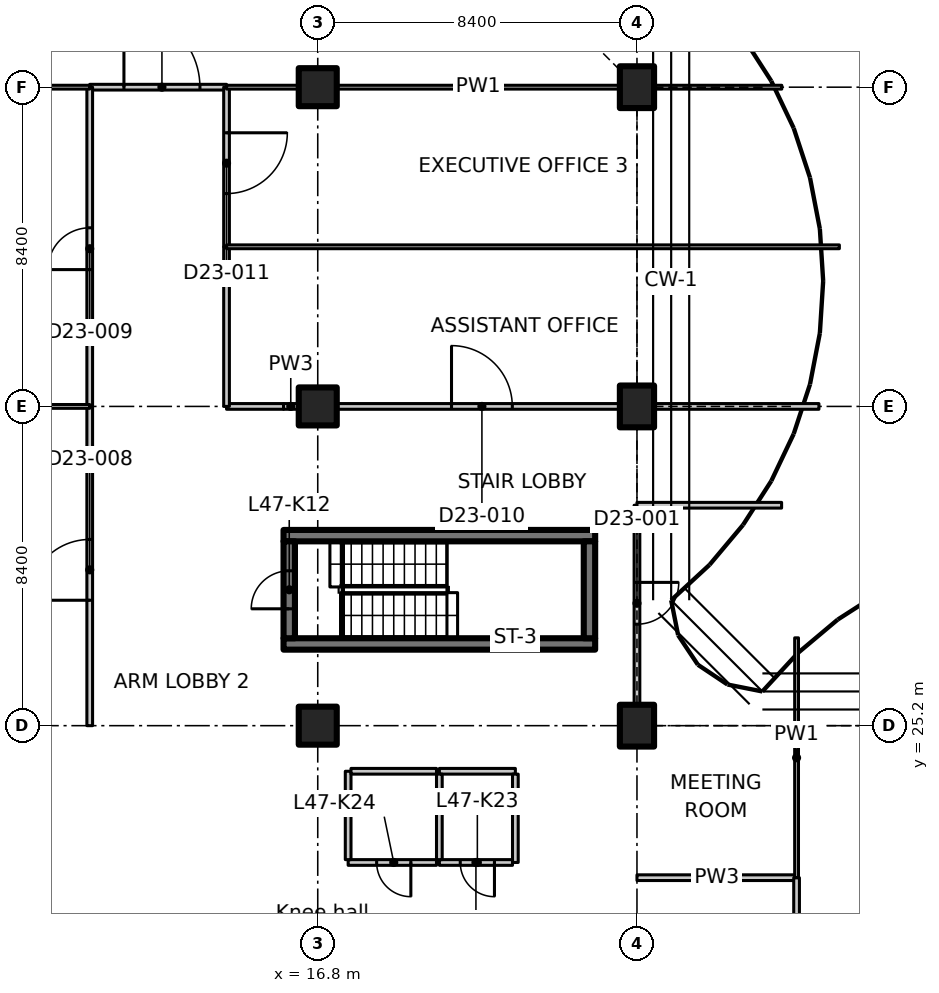
"""IFC4 building model, lengths in metres.
Left out: names, types, materials, properties, quantities, classifications, styles, units other than length and angle.
Written with IfcOpenShell. Run it as: python <this file> out.ifc"""

import sys

from ifc_helpers import new_model, si_unit, direction, frame, frame_2d, origin, origin_2d, place, context, subcontext, project, spatial, polyline, rectangle, outline, extrude, element, fill, save


model = new_model("IFC4")
c1 = context("Model", 3, precision=1e-05, world=origin(), true_north=direction((0.0, 1.0)))
c2 = subcontext(c1, "Body", "Model", "MODEL_VIEW")
j1 = project(units=[si_unit("LENGTHUNIT", "METRE"), si_unit("PLANEANGLEUNIT", "RADIAN")], contexts=[c1])
p1 = place(None, origin())
s1 = spatial("IfcSite", under=j1, at=p1, CompositionType="ELEMENT")
p2 = place(p1, origin())
s2 = spatial("IfcBuilding", under=s1, at=p2, CompositionType="ELEMENT")
p3 = place(p2, frame((0.0, 0.0, 188.4)))
s3 = spatial("IfcBuildingStorey", under=s2, at=p3, CompositionType="ELEMENT", Elevation=188.4)
for number, where, z_axis, x_axis in (
    (1, (16.8, 25.2, 0.0), (0.0, 0.0, 1.0), (1.0, 0.0, 0.0)),
    (2, (16.8, 33.6, 0.0), (0.0, 0.0, 1.0), (1.0, 0.0, 0.0)),
    (3, (16.8, 42.0, 0.0), (0.0, 0.0, 1.0), (1.0, 0.0, 0.0)),
):
    element("IfcColumn", number, at=place(p3, frame(where, z_axis=z_axis, x_axis=x_axis)), inside=s3, PredefinedType="COLUMN", context=c2, shape_type="SweptSolid", body=[
        extrude(rectangle(XDim=1.0, YDim=1.0, at=origin_2d()), origin(), (0.0, 0.0, 1.0), 3.35),
    ])
for number, where, z_axis, x_axis in (
    (4, (25.2, 25.2, 0.0), (0.0, 0.0, 1.0), (1.0, 0.0, 0.0)),
    (5, (25.2, 33.6, 0.0), (0.0, 0.0, 1.0), (1.0, 0.0, 0.0)),
    (6, (25.2, 42.0, 0.0), (0.0, 0.0, 1.0), (1.0, 0.0, 0.0)),
):
    element("IfcColumn", number, at=place(p3, frame(where, z_axis=z_axis, x_axis=x_axis)), inside=s3, PredefinedType="COLUMN", context=c2, shape_type="SweptSolid", body=[
        extrude(rectangle(XDim=0.9, YDim=1.1, at=origin_2d()), origin(), (0.0, 0.0, 1.0), 3.35),
    ])
for number, where, z_axis, x_axis in (
    (7, (15.9, 27.35, 0.0), (0.0, 0.0, 1.0), (1.0, 0.0, 0.0)),
    (8, (15.9, 30.2, 0.0), (0.0, 0.0, 1.0), (1.0, 0.0, 0.0)),
):
    element("IfcWall", number, at=place(p3, frame(where, z_axis=z_axis, x_axis=x_axis)), inside=s3, PredefinedType="SHEAR", context=c2, shape_type="SweptSolid", body=[
        extrude(rectangle(XDim=8.2, YDim=0.3, at=frame_2d((4.1, 0.0))), origin(), (0.0, 0.0, 1.0), 3.35),
    ])
p4 = place(p3, frame((16.05, 27.5, 0.0), z_axis=(0.0, 0.0, 1.0), x_axis=(0.0, 1.0, 0.0)))
e9 = element("IfcWall", 9, at=p4, inside=s3, PredefinedType="SHEAR", context=c2, shape_type="SweptSolid", body=[
    extrude(rectangle(XDim=2.55, YDim=0.3, at=frame_2d((1.275, 0.0))), origin(), (0.0, 0.0, 1.0), 3.35),
])
p5 = place(p4, frame((0.775, 0.0, 0.0)))
e10 = element("IfcOpeningElement", 10, at=p5, cuts=e9, PredefinedType="OPENING", context=c2, shape_type="SweptSolid", body=[
    extrude(rectangle(XDim=1.0, YDim=2.1, at=frame_2d((0.5, 1.05))), frame((0.0, 0.16, 0.0), z_axis=(0.0, -1.0, 0.0), x_axis=(1.0, 0.0, 0.0)), (0.0, 0.0, 1.0), 0.32),
])
p6 = place(p3, frame((23.95, 27.5, 0.0), z_axis=(0.0, 0.0, 1.0), x_axis=(0.0, 1.0, 0.0)))
e11 = element("IfcWall", 11, at=p6, inside=s3, PredefinedType="SHEAR", context=c2, shape_type="SweptSolid", body=[
    extrude(rectangle(XDim=2.55, YDim=0.3, at=frame_2d((1.275, 0.0))), origin(), (0.0, 0.0, 1.0), 3.35),
])
p7 = place(p3, frame((20.0, 24.0, 0.0), z_axis=(0.0, 0.0, 1.0), x_axis=(1.0, 0.0, 0.0)))
e12 = element("IfcWall", 12, at=p7, inside=s3, PredefinedType="PARTITIONING", context=c2, shape_type="SweptSolid", body=[
    extrude(rectangle(XDim=2.0, YDim=0.15, at=frame_2d((1.0, 0.0))), origin(), (0.0, 0.0, 1.0), 3.35),
])
p8 = place(p3, frame((22.0, 23.925, 0.0), z_axis=(0.0, 0.0, 1.0), x_axis=(0.0, -1.0, 0.0)))
e13 = element("IfcWall", 13, at=p8, inside=s3, PredefinedType="PARTITIONING", context=c2, shape_type="SweptSolid", body=[
    extrude(rectangle(XDim=2.325, YDim=0.15, at=frame_2d((1.163, 0.0))), origin(), (0.0, 0.0, 1.0), 3.35),
])
p9 = place(p3, frame((21.925, 21.6, 0.0), z_axis=(0.0, 0.0, 1.0), x_axis=(-1.0, 0.0, 0.0)))
e14 = element("IfcWall", 14, at=p9, inside=s3, PredefinedType="PARTITIONING", context=c2, shape_type="SweptSolid", body=[
    extrude(rectangle(XDim=1.925, YDim=0.15, at=frame_2d((0.962, 0.0))), origin(), (0.0, 0.0, 1.0), 3.35),
])
p10 = place(p9, frame((0.475, 0.0, 0.0)))
e15 = element("IfcOpeningElement", 15, at=p10, cuts=e14, PredefinedType="OPENING", context=c2, shape_type="SweptSolid", body=[
    extrude(rectangle(XDim=0.9, YDim=2.1, at=frame_2d((0.45, 1.05))), frame((0.0, 0.085, 0.0), z_axis=(0.0, -1.0, 0.0), x_axis=(1.0, 0.0, 0.0)), (0.0, 0.0, 1.0), 0.17),
])
p11 = place(p3, frame((20.0, 21.675, 0.0), z_axis=(0.0, 0.0, 1.0), x_axis=(0.0, 1.0, 0.0)))
e16 = element("IfcWall", 16, at=p11, inside=s3, PredefinedType="PARTITIONING", context=c2, shape_type="SweptSolid", body=[
    extrude(rectangle(XDim=2.25, YDim=0.15, at=frame_2d((1.125, 0.0))), origin(), (0.0, 0.0, 1.0), 3.35),
])
p12 = place(p3, frame((19.925, 21.6, 0.0), z_axis=(0.0, 0.0, 1.0), x_axis=(-1.0, 0.0, 0.0)))
e17 = element("IfcWall", 17, at=p12, inside=s3, PredefinedType="PARTITIONING", context=c2, shape_type="SweptSolid", body=[
    extrude(rectangle(XDim=2.325, YDim=0.15, at=frame_2d((1.163, 0.0))), origin(), (0.0, 0.0, 1.0), 3.35),
])
p13 = place(p12, frame((0.675, 0.0, 0.0)))
e18 = element("IfcOpeningElement", 18, at=p13, cuts=e17, PredefinedType="OPENING", context=c2, shape_type="SweptSolid", body=[
    extrude(rectangle(XDim=0.9, YDim=2.1, at=frame_2d((0.45, 1.05))), frame((0.0, 0.085, 0.0), z_axis=(0.0, -1.0, 0.0), x_axis=(1.0, 0.0, 0.0)), (0.0, 0.0, 1.0), 0.17),
])
p14 = place(p3, frame((17.6, 21.675, 0.0), z_axis=(0.0, 0.0, 1.0), x_axis=(0.0, 1.0, 0.0)))
e19 = element("IfcWall", 19, at=p14, inside=s3, PredefinedType="PARTITIONING", context=c2, shape_type="SweptSolid", body=[
    extrude(rectangle(XDim=2.325, YDim=0.15, at=frame_2d((1.163, 0.0))), origin(), (0.0, 0.0, 1.0), 3.35),
])
p15 = place(p3, frame((17.675, 24.0, 0.0), z_axis=(0.0, 0.0, 1.0), x_axis=(1.0, 0.0, 0.0)))
e20 = element("IfcWall", 20, at=p15, inside=s3, PredefinedType="PARTITIONING", context=c2, shape_type="SweptSolid", body=[
    extrude(rectangle(XDim=2.25, YDim=0.15, at=frame_2d((1.125, 0.0))), origin(), (0.0, 0.0, 1.0), 3.35),
])
p16 = place(p3, frame((25.2, 21.2, 0.0), z_axis=(0.0, 0.0, 1.0), x_axis=(1.0, 0.0, 0.0)))
e21 = element("IfcWall", 21, at=p16, inside=s3, PredefinedType="PARTITIONING", context=c2, shape_type="SweptSolid", body=[
    extrude(rectangle(XDim=4.2, YDim=0.15, at=frame_2d((2.1, 0.0))), origin(), (0.0, 0.0, 1.0), 3.33),
])
p17 = place(p3, frame((29.4, 21.2, 0.0), z_axis=(0.0, 0.0, 1.0), x_axis=(0.0, -1.0, 0.0)))
e22 = element("IfcWall", 22, at=p17, inside=s3, PredefinedType="PARTITIONING", context=c2, shape_type="SweptSolid", body=[
    extrude(rectangle(XDim=8.2, YDim=0.15, at=frame_2d((4.1, 0.0))), origin(), (0.0, 0.0, 1.0), 3.33),
])
p18 = place(p3, frame((29.4, 27.511, 0.0), z_axis=(0.0, 0.0, 1.0), x_axis=(0.0, -1.0, 0.0)))
e23 = element("IfcWall", 23, at=p18, inside=s3, PredefinedType="PARTITIONING", context=c2, shape_type="SweptSolid", body=[
    extrude(outline(polyline([(0.0, 0.0), (6.311, 0.0), (6.311, 3.33), (2.761, 3.33), (2.759, 2.98), (1.863, 2.98), (1.861, 3.33), (0.236, 3.33), (0.0, 3.33), (0.0, 0.0)])), frame((0.0, 0.05, 0.0), z_axis=(0.0, -1.0, 0.0), x_axis=(1.0, 0.0, 0.0)), (0.0, 0.0, 1.0), 0.1),
])
p19 = place(p3, frame((25.2, 31.0, 0.0), z_axis=(0.0, 0.0, 1.0), x_axis=(0.0, -1.0, 0.0)))
e24 = element("IfcWall", 24, at=p19, inside=s3, PredefinedType="PARTITIONING", context=c2, shape_type="SweptSolid", body=[
    extrude(outline(polyline([(0.0, 0.0), (5.23, 0.0), (5.23, 2.98), (0.0, 2.98), (0.0, 0.0)])), frame((0.0, 0.075, 0.0), z_axis=(0.0, -1.0, 0.0), x_axis=(1.0, 0.0, 0.0)), (0.0, 0.0, 1.0), 0.15),
])
p20 = place(p19, frame((2.03, 0.0, 0.0)))
e25 = element("IfcOpeningElement", 25, at=p20, cuts=e24, PredefinedType="OPENING", context=c2, shape_type="SweptSolid", body=[
    extrude(rectangle(XDim=1.1, YDim=2.1, at=frame_2d((0.55, 1.05))), frame((0.0, 0.085, 0.0), z_axis=(0.0, -1.0, 0.0), x_axis=(1.0, 0.0, 0.0)), (0.0, 0.0, 1.0), 0.17),
])
p21 = place(p3, frame((25.2, 31.0, 0.0), z_axis=(0.0, 0.0, 1.0), x_axis=(1.0, 0.0, 0.0)))
e26 = element("IfcWall", 26, at=p21, inside=s3, PredefinedType="PARTITIONING", context=c2, shape_type="SweptSolid", body=[
    extrude(rectangle(XDim=3.806, YDim=0.15, at=frame_2d((1.903, 0.0))), origin(), (0.0, 0.0, 1.0), 2.98),
])
p22 = place(p3, frame((10.8, 25.2, 0.0), z_axis=(0.0, 0.0, 1.0), x_axis=(0.0, 1.0, 0.0)))
e27 = element("IfcWall", 27, at=p22, inside=s3, PredefinedType="PARTITIONING", context=c2, shape_type="SweptSolid", body=[
    extrude(rectangle(XDim=8.4, YDim=0.15, at=frame_2d((4.2, 0.0))), origin(), (0.0, 0.0, 1.0), 3.33),
])
p23 = place(p22, frame((3.3, 0.0, 0.0)))
e28 = element("IfcOpeningElement", 28, at=p23, cuts=e27, PredefinedType="OPENING", context=c2, shape_type="SweptSolid", body=[
    extrude(rectangle(XDim=1.6, YDim=2.1, at=frame_2d((0.8, 1.05))), frame((0.0, 0.085, 0.0), z_axis=(0.0, -1.0, 0.0), x_axis=(1.0, 0.0, 0.0)), (0.0, 0.0, 1.0), 0.17),
])
p24 = place(p3, frame((14.4, 33.6, 0.0), z_axis=(0.0, 0.0, 1.0), x_axis=(1.0, 0.0, 0.0)))
e29 = element("IfcWall", 29, at=p24, inside=s3, PredefinedType="PARTITIONING", context=c2, shape_type="SweptSolid", body=[
    extrude(rectangle(XDim=1.5, YDim=0.15, at=frame_2d((0.75, 0.0))), origin(), (0.0, 0.0, 1.0), 3.33),
])
p25 = place(p3, frame((15.9, 33.6, 0.0), z_axis=(0.0, 0.0, 1.0), x_axis=(1.0, 0.0, 0.0)))
e30 = element("IfcWall", 30, at=p25, inside=s3, PredefinedType="PARTITIONING", context=c2, shape_type="SweptSolid", body=[
    extrude(rectangle(XDim=0.38, YDim=0.15, at=frame_2d((0.19, 0.0))), origin(), (0.0, 0.0, 1.0), 3.33),
])
p26 = place(p3, frame((17.32, 33.6, 0.0), z_axis=(0.0, 0.0, 1.0), x_axis=(1.0, 0.0, 0.0)))
e31 = element("IfcWall", 31, at=p26, inside=s3, PredefinedType="PARTITIONING", context=c2, shape_type="SweptSolid", body=[
    extrude(rectangle(XDim=7.41, YDim=0.15, at=frame_2d((3.705, 0.0))), origin(), (0.0, 0.0, 1.0), 3.33),
])
p27 = place(p26, frame((3.0, 0.0, 0.0)))
e32 = element("IfcOpeningElement", 32, at=p27, cuts=e31, PredefinedType="OPENING", context=c2, shape_type="SweptSolid", body=[
    extrude(rectangle(XDim=1.6, YDim=2.1, at=frame_2d((0.8, 1.05))), frame((0.0, 0.085, 0.0), z_axis=(0.0, -1.0, 0.0), x_axis=(1.0, 0.0, 0.0)), (0.0, 0.0, 1.0), 0.17),
])
p28 = place(p3, frame((25.67, 33.6, 0.0), z_axis=(0.0, 0.0, 1.0), x_axis=(1.0, 0.0, 0.0)))
e33 = element("IfcWall", 33, at=p28, inside=s3, PredefinedType="PARTITIONING", context=c2, shape_type="SweptSolid", body=[
    extrude(rectangle(XDim=4.318, YDim=0.15, at=frame_2d((2.159, 0.0))), origin(), (0.0, 0.0, 1.0), 2.98),
])
p29 = place(p3, frame((10.8, 42.0, 0.0), z_axis=(0.0, 0.0, 1.0), x_axis=(1.0, 0.0, 0.0)))
e34 = element("IfcWall", 34, at=p29, inside=s3, PredefinedType="PARTITIONING", context=c2, shape_type="SweptSolid", body=[
    extrude(rectangle(XDim=3.6, YDim=0.15, at=frame_2d((1.8, 0.0))), origin(), (0.0, 0.0, 1.0), 3.33),
])
p30 = place(p29, frame((0.9, 0.0, 0.0)))
e35 = element("IfcOpeningElement", 35, at=p30, cuts=e34, PredefinedType="OPENING", context=c2, shape_type="SweptSolid", body=[
    extrude(rectangle(XDim=2.0, YDim=2.4, at=frame_2d((1.0, 1.2))), frame((0.0, 0.085, 0.0), z_axis=(0.0, -1.0, 0.0), x_axis=(1.0, 0.0, 0.0)), (0.0, 0.0, 1.0), 0.17),
])
p31 = place(p3, frame((10.8, 33.6, 0.0), z_axis=(0.0, 0.0, 1.0), x_axis=(0.0, 1.0, 0.0)))
e36 = element("IfcWall", 36, at=p31, inside=s3, PredefinedType="PARTITIONING", context=c2, shape_type="SweptSolid", body=[
    extrude(rectangle(XDim=8.4, YDim=0.15, at=frame_2d((4.2, 0.0))), origin(), (0.0, 0.0, 1.0), 3.33),
])
p32 = place(p31, frame((3.6, 0.0, 0.0)))
e37 = element("IfcOpeningElement", 37, at=p32, cuts=e36, PredefinedType="OPENING", context=c2, shape_type="SweptSolid", body=[
    extrude(rectangle(XDim=1.1, YDim=2.1, at=frame_2d((0.55, 1.05))), frame((0.0, 0.085, 0.0), z_axis=(0.0, -1.0, 0.0), x_axis=(1.0, 0.0, 0.0)), (0.0, 0.0, 1.0), 0.17),
])
p33 = place(p3, frame((14.4, 37.8, 0.0), z_axis=(0.0, 0.0, 1.0), x_axis=(0.0, -1.0, 0.0)))
e38 = element("IfcWall", 38, at=p33, inside=s3, PredefinedType="PARTITIONING", context=c2, shape_type="SweptSolid", body=[
    extrude(rectangle(XDim=4.2, YDim=0.15, at=frame_2d((2.1, 0.0))), origin(), (0.0, 0.0, 1.0), 3.33),
])
p34 = place(p3, frame((14.4, 42.0, 0.0), z_axis=(0.0, 0.0, 1.0), x_axis=(0.0, -1.0, 0.0)))
e39 = element("IfcWall", 39, at=p34, inside=s3, PredefinedType="PARTITIONING", context=c2, shape_type="SweptSolid", body=[
    extrude(rectangle(XDim=4.2, YDim=0.15, at=frame_2d((2.1, 0.0))), origin(), (0.0, 0.0, 1.0), 3.33),
])
p35 = place(p34, frame((1.2, 0.0, 0.0)))
e40 = element("IfcOpeningElement", 40, at=p35, cuts=e39, PredefinedType="OPENING", context=c2, shape_type="SweptSolid", body=[
    extrude(rectangle(XDim=1.6, YDim=2.1, at=frame_2d((0.8, 1.05))), frame((0.0, 0.085, 0.0), z_axis=(0.0, -1.0, 0.0), x_axis=(1.0, 0.0, 0.0)), (0.0, 0.0, 1.0), 0.17),
])
p36 = place(p3, frame((10.8, 42.0, 0.0), z_axis=(0.0, 0.0, 1.0), x_axis=(-1.0, 0.0, 0.0)))
e41 = element("IfcWall", 41, at=p36, inside=s3, PredefinedType="PARTITIONING", context=c2, shape_type="SweptSolid", body=[
    extrude(rectangle(XDim=1.88, YDim=0.1, at=frame_2d((0.94, 0.0))), origin(), (0.0, 0.0, 1.0), 3.33),
])
p37 = place(p3, frame((29.011, 42.0, 0.0), z_axis=(0.0, 0.0, 1.0), x_axis=(-1.0, 0.0, 0.0)))
e42 = element("IfcWall", 42, at=p37, inside=s3, PredefinedType="PARTITIONING", context=c2, shape_type="SweptSolid", body=[
    extrude(rectangle(XDim=3.342, YDim=0.1, at=frame_2d((1.671, 0.0))), origin(), (0.0, 0.0, 1.0), 2.98),
])
p38 = place(p3, frame((24.73, 42.0, 0.0), z_axis=(0.0, 0.0, 1.0), x_axis=(-1.0, 0.0, 0.0)))
e43 = element("IfcWall", 43, at=p38, inside=s3, PredefinedType="PARTITIONING", context=c2, shape_type="SweptSolid", body=[
    extrude(outline(polyline([(0.0, 0.0), (7.41, 0.0), (7.41, 3.33), (0.196, 3.33), (0.194, 2.98), (0.0, 2.98), (0.0, 0.0)])), frame((0.0, 0.05, 0.0), z_axis=(0.0, -1.0, 0.0), x_axis=(1.0, 0.0, 0.0)), (0.0, 0.0, 1.0), 0.1),
])
for number, where, z_axis, x_axis in (
    (44, (16.28, 42.0, 0.0), (0.0, 0.0, 1.0), (-1.0, 0.0, 0.0)),
    (45, (8.92, 33.6, 0.0), (0.0, 0.0, 1.0), (1.0, 0.0, 0.0)),
):
    element("IfcWall", number, at=place(p3, frame(where, z_axis=z_axis, x_axis=x_axis)), inside=s3, PredefinedType="PARTITIONING", context=c2, shape_type="SweptSolid", body=[
        extrude(rectangle(XDim=1.88, YDim=0.1, at=frame_2d((0.94, 0.0))), origin(), (0.0, 0.0, 1.0), 3.33),
    ])
p39 = place(p3, frame((14.4, 37.8, 0.0), z_axis=(0.0, 0.0, 1.0), x_axis=(1.0, 0.0, 0.0)))
e46 = element("IfcWall", 46, at=p39, inside=s3, PredefinedType="PARTITIONING", context=c2, shape_type="SweptSolid", body=[
    extrude(outline(polyline([(0.0, 0.0), (16.126, 0.0), (16.126, 3.33), (15.843, 3.33), (11.25, 3.33), (11.248, 2.98), (10.352, 2.98), (10.35, 3.33), (0.0, 3.33), (0.0, 0.0)])), frame((0.0, 0.05, 0.0), z_axis=(0.0, -1.0, 0.0), x_axis=(1.0, 0.0, 0.0)), (0.0, 0.0, 1.0), 0.1),
])
p40 = place(p5, origin())
e47 = element("IfcDoor", 47, at=p40, inside=s3, OperationType="SINGLE_SWING_RIGHT", PredefinedType="DOOR", context=c2, shape_type="SweptSolid", body=[
    extrude(rectangle(XDim=1.0, YDim=2.1, at=frame_2d((0.5, 1.05))), frame((0.0, 0.025, 0.0), z_axis=(0.0, -1.0, 0.0), x_axis=(1.0, 0.0, 0.0)), (0.0, 0.0, 1.0), 0.05),
])
fill(e10, e47)
p41 = place(p10, origin())
e48 = element("IfcDoor", 48, at=p41, inside=s3, OperationType="SINGLE_SWING_LEFT", PredefinedType="DOOR", context=c2, shape_type="SweptSolid", body=[
    extrude(rectangle(XDim=0.9, YDim=2.1, at=frame_2d((0.45, 1.05))), frame((0.0, 0.025, 0.0), z_axis=(0.0, -1.0, 0.0), x_axis=(1.0, 0.0, 0.0)), (0.0, 0.0, 1.0), 0.05),
])
fill(e15, e48)
p42 = place(p13, origin())
e49 = element("IfcDoor", 49, at=p42, inside=s3, OperationType="SINGLE_SWING_RIGHT", PredefinedType="DOOR", context=c2, shape_type="SweptSolid", body=[
    extrude(rectangle(XDim=0.9, YDim=2.1, at=frame_2d((0.45, 1.05))), frame((0.0, 0.025, 0.0), z_axis=(0.0, -1.0, 0.0), x_axis=(1.0, 0.0, 0.0)), (0.0, 0.0, 1.0), 0.05),
])
fill(e18, e49)
p43 = place(p20, origin())
e50 = element("IfcDoor", 50, at=p43, inside=s3, OperationType="SINGLE_SWING_RIGHT", PredefinedType="DOOR", context=c2, shape_type="SweptSolid", body=[
    extrude(rectangle(XDim=1.1, YDim=2.1, at=frame_2d((0.55, 1.05))), frame((0.0, 0.025, 0.0), z_axis=(0.0, -1.0, 0.0), x_axis=(1.0, 0.0, 0.0)), (0.0, 0.0, 1.0), 0.05),
])
fill(e25, e50)
p44 = place(p30, origin())
e51 = element("IfcDoor", 51, at=p44, inside=s3, OperationType="DOUBLE_DOOR_SINGLE_SWING", PredefinedType="DOOR", context=c2, shape_type="SweptSolid", body=[
    extrude(rectangle(XDim=2.0, YDim=2.4, at=frame_2d((1.0, 1.2))), frame((0.0, 0.025, 0.0), z_axis=(0.0, -1.0, 0.0), x_axis=(1.0, 0.0, 0.0)), (0.0, 0.0, 1.0), 0.05),
])
fill(e35, e51)
p45 = place(p23, origin())
e52 = element("IfcDoor", 52, at=p45, inside=s3, OperationType="DOUBLE_DOOR_SINGLE_SWING", PredefinedType="DOOR", context=c2, shape_type="SweptSolid", body=[
    extrude(rectangle(XDim=1.6, YDim=2.1, at=frame_2d((0.8, 1.05))), frame((0.0, 0.025, 0.0), z_axis=(0.0, -1.0, 0.0), x_axis=(1.0, 0.0, 0.0)), (0.0, 0.0, 1.0), 0.05),
])
fill(e28, e52)
p46 = place(p32, origin())
e53 = element("IfcDoor", 53, at=p46, inside=s3, OperationType="SINGLE_SWING_LEFT", PredefinedType="DOOR", context=c2, shape_type="SweptSolid", body=[
    extrude(rectangle(XDim=1.1, YDim=2.1, at=frame_2d((0.55, 1.05))), frame((0.0, 0.025, 0.0), z_axis=(0.0, -1.0, 0.0), x_axis=(1.0, 0.0, 0.0)), (0.0, 0.0, 1.0), 0.05),
])
fill(e37, e53)
p47 = place(p27, origin())
e54 = element("IfcDoor", 54, at=p47, inside=s3, OperationType="DOUBLE_DOOR_SINGLE_SWING", PredefinedType="DOOR", context=c2, shape_type="SweptSolid", body=[
    extrude(rectangle(XDim=1.6, YDim=2.1, at=frame_2d((0.8, 1.05))), frame((0.0, 0.025, 0.0), z_axis=(0.0, -1.0, 0.0), x_axis=(1.0, 0.0, 0.0)), (0.0, 0.0, 1.0), 0.05),
])
fill(e32, e54)
p48 = place(p35, origin())
e55 = element("IfcDoor", 55, at=p48, inside=s3, OperationType="DOUBLE_DOOR_SINGLE_SWING", PredefinedType="DOOR", context=c2, shape_type="SweptSolid", body=[
    extrude(rectangle(XDim=1.6, YDim=2.1, at=frame_2d((0.8, 1.05))), frame((0.0, 0.025, 0.0), z_axis=(0.0, -1.0, 0.0), x_axis=(1.0, 0.0, 0.0)), (0.0, 0.0, 1.0), 0.05),
])
fill(e40, e55)
save(model, sys.argv[1])
